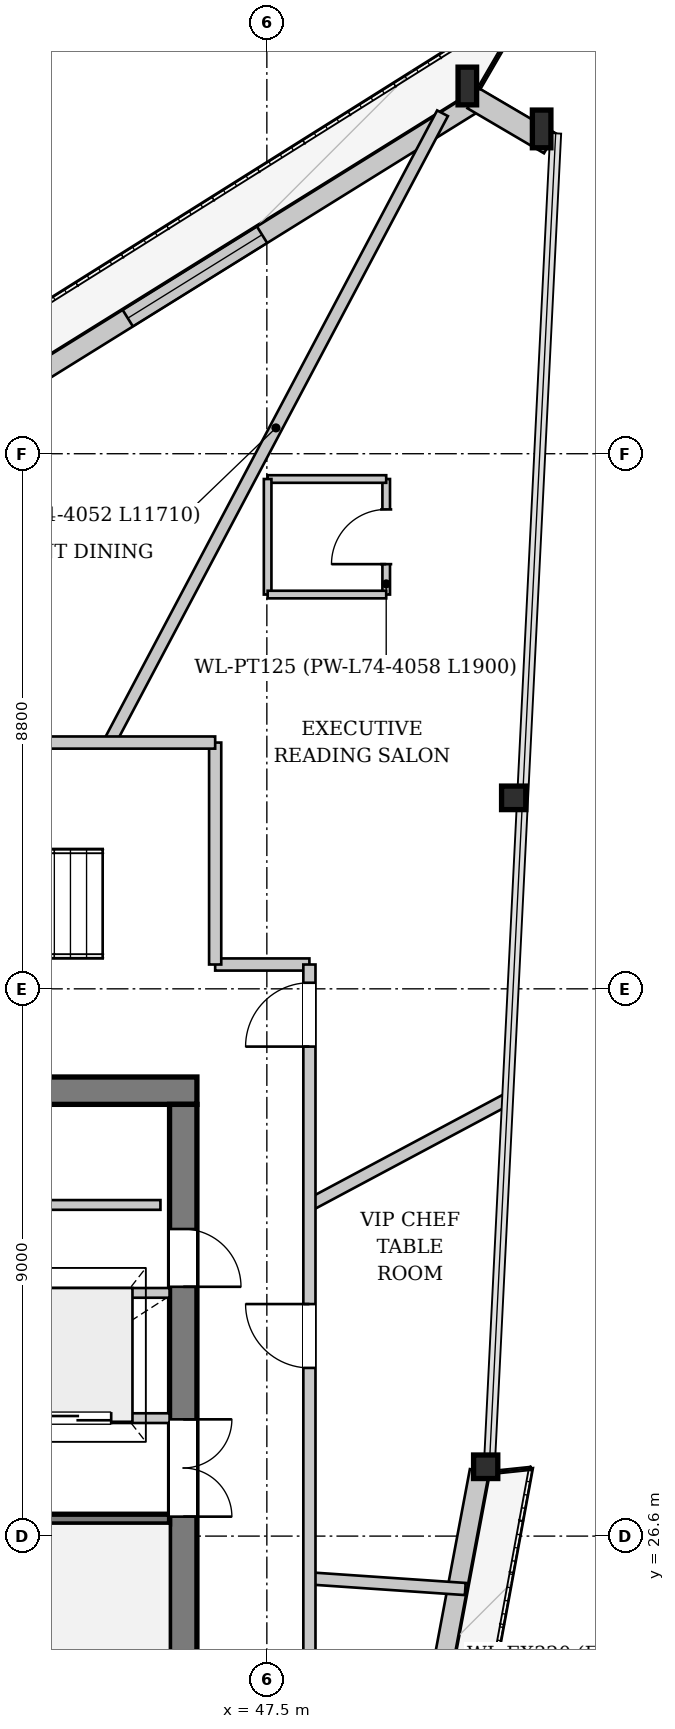
"""IFC4 building model, lengths in metres.
Left out: names, types, materials, properties, quantities, classifications, styles, units other than length and angle.
Written with IfcOpenShell. Run it as: python <this file> out.ifc"""

import sys

from ifc_helpers import new_model, si_unit, direction, frame, frame_2d, origin, origin_2d, place, context, subcontext, project, spatial, rectangle, i_section, extrude, source, transform, mapped, element, fill, save


model = new_model("IFC4")
c1 = context("Model", 3, precision=1e-05, world=origin(), true_north=direction((0.0, 1.0)))
c2 = subcontext(c1, "Body", "Model", "MODEL_VIEW")
j1 = project(units=[si_unit("LENGTHUNIT", "METRE"), si_unit("PLANEANGLEUNIT", "RADIAN")], contexts=[c1])
p1 = place(None, origin())
s1 = spatial("IfcSite", under=j1, at=p1, CompositionType="ELEMENT")
p2 = place(p1, origin())
s2 = spatial("IfcBuilding", under=s1, at=p2, CompositionType="ELEMENT")
p3 = place(p2, frame((0.0, 0.0, 277.7)))
s3 = spatial("IfcBuildingStorey", under=s2, at=p3, CompositionType="ELEMENT", Elevation=277.7)
m1 = source(origin(), c2, "Body", "SweptSolid", [
    extrude(i_section(OverallWidth=0.305, OverallDepth=0.62, WebThickness=0.021, FlangeThickness=0.04, at=origin_2d()), origin(), (0.0, 0.0, 1.0), 3.965),
])
p4 = place(p3, frame((52.25, 49.668, 0.0), z_axis=(-0.116565767107, 0.036761628612, 0.992502395262), x_axis=(-0.30076967496, -0.953696808543, 0.0)))
e1 = element("IfcColumn", 1, at=p4, inside=s3, PredefinedType="COLUMN", context=c2, shape_type="MappedRepresentation", body=[
    mapped(m1, transform((0.0, 0.0, 0.0), x_axis=(1.0, 0.0, 0.0), y_axis=(0.0, 1.0, 0.0), z_axis=(0.0, 0.0, 1.0), scale=1.0)),
])
m2 = source(origin(), c2, "Body", "SweptSolid", [
    extrude(i_section(OverallWidth=0.305, OverallDepth=0.62, WebThickness=0.021, FlangeThickness=0.04, at=origin_2d()), origin(), (0.0, 0.0, 1.0), 3.955),
])
p5 = place(p3, frame((50.991, 50.409, 0.0), z_axis=(-0.098091029512, 0.019568820865, 0.994985030631), x_axis=(-0.195641369689, -0.980675509262, 0.0)))
e2 = element("IfcColumn", 2, at=p5, inside=s3, PredefinedType="COLUMN", context=c2, shape_type="MappedRepresentation", body=[
    mapped(m2, transform((0.0, 0.0, 0.0), x_axis=(1.0, 0.0, 0.0), y_axis=(0.0, 1.0, 0.0), z_axis=(0.0, 0.0, 1.0), scale=1.0)),
])
m3 = source(origin(), c2, "Body", "SweptSolid", [
    extrude(i_section(OverallWidth=0.398, OverallDepth=0.387, WebThickness=0.019, FlangeThickness=0.029, at=origin_2d()), origin(), (0.0, 0.0, 1.0), 3.941),
])
p6 = place(p3, frame((51.154, 27.642, 0.0), z_axis=(-0.027750061815, 0.049615623914, 0.998382804305), x_axis=(-0.872766014986, -0.488138794899, 0.0)))
e3 = element("IfcColumn", 3, at=p6, inside=s3, PredefinedType="COLUMN", context=c2, shape_type="MappedRepresentation", body=[
    mapped(m3, transform((0.0, 0.0, 0.0), x_axis=(1.0, 0.0, 0.0), y_axis=(0.0, 1.0, 0.0), z_axis=(0.0, 0.0, 1.0), scale=1.0)),
])
m4 = source(origin(), c2, "Body", "SweptSolid", [
    extrude(i_section(OverallWidth=0.398, OverallDepth=0.387, WebThickness=0.019, FlangeThickness=0.029, at=origin_2d()), origin(), (0.0, 0.0, 1.0), 3.949),
])
p7 = place(p3, frame((51.702, 38.656, 0.0), z_axis=(-0.072270027482, 0.043213643464, 0.996448505517), x_axis=(-0.513199536889, -0.858269325641, 0.0)))
e4 = element("IfcColumn", 4, at=p7, inside=s3, PredefinedType="COLUMN", context=c2, shape_type="MappedRepresentation", body=[
    mapped(m4, transform((0.0, 0.0, 0.0), x_axis=(1.0, 0.0, 0.0), y_axis=(0.0, 1.0, 0.0), z_axis=(0.0, 0.0, 1.0), scale=1.0)),
])
p8 = place(p3, frame((50.997, 27.672, 0.0), z_axis=(0.0, 0.0, 1.0), x_axis=(-0.184819886047, -0.982772409931, 0.0)))
e5 = element("IfcWall", 5, at=p8, inside=s3, PredefinedType="SOLIDWALL", context=c2, shape_type="SweptSolid", body=[
    extrude(rectangle(XDim=22.053, YDim=0.32, at=frame_2d((11.027, 0.0))), origin(), (0.0, 0.0, 1.0), 3.462),
])
p9 = place(p8, frame((6.307, 0.0, 0.0)))
e6 = element("IfcOpeningElement", 6, at=p9, cuts=e5, PredefinedType="OPENING", context=c2, shape_type="SweptSolid", body=[
    extrude(rectangle(XDim=1.5, YDim=2.3, at=frame_2d((0.75, 1.15))), frame((0.0, 0.17, 0.0), z_axis=(0.0, -1.0, 0.0), x_axis=(1.0, 0.0, 0.0)), (0.0, 0.0, 1.0), 0.34),
])
p10 = place(p8, frame((13.919, 0.0, 0.65)))
e7 = element("IfcOpeningElement", 7, at=p10, cuts=e5, PredefinedType="OPENING", context=c2, shape_type="SweptSolid", body=[
    extrude(rectangle(XDim=2.6, YDim=2.35, at=frame_2d((1.3, 1.175))), frame((0.0, 0.17, 0.0), z_axis=(0.0, -1.0, 0.0), x_axis=(1.0, 0.0, 0.0)), (0.0, 0.0, 1.0), 0.34),
])
p11 = place(p3, frame((32.774, 38.898, 0.0), z_axis=(0.0, 0.0, 1.0), x_axis=(0.849325275004, 0.527869848769, 0.0)))
e8 = element("IfcWall", 8, at=p11, inside=s3, PredefinedType="SOLIDWALL", context=c2, shape_type="SweptSolid", body=[
    extrude(rectangle(XDim=21.549, YDim=0.32, at=frame_2d((10.774, 0.0))), origin(), (0.0, 0.0, 1.0), 3.462),
])
p12 = place(p11, frame((6.146, 0.0, 0.0)))
e9 = element("IfcOpeningElement", 9, at=p12, cuts=e8, PredefinedType="OPENING", context=c2, shape_type="SweptSolid", body=[
    extrude(rectangle(XDim=1.5, YDim=2.3, at=frame_2d((0.75, 1.15))), frame((0.0, 0.17, 0.0), z_axis=(0.0, -1.0, 0.0), x_axis=(1.0, 0.0, 0.0)), (0.0, 0.0, 1.0), 0.34),
])
p13 = place(p11, frame((14.646, 0.0, 0.65)))
e10 = element("IfcOpeningElement", 10, at=p13, cuts=e8, PredefinedType="OPENING", context=c2, shape_type="SweptSolid", body=[
    extrude(rectangle(XDim=2.6, YDim=2.35, at=frame_2d((1.3, 1.175))), frame((0.0, 0.17, 0.0), z_axis=(0.0, -1.0, 0.0), x_axis=(1.0, 0.0, 0.0)), (0.0, 0.0, 1.0), 0.34),
])
p14 = place(p3, frame((50.895, 50.245, 0.0), z_axis=(0.0, 0.0, 1.0), x_axis=(0.862045920942, -0.506830178844, 0.0)))
e11 = element("IfcWall", 11, at=p14, inside=s3, PredefinedType="SOLIDWALL", context=c2, shape_type="SweptSolid", body=[
    extrude(rectangle(XDim=1.46, YDim=0.38, at=frame_2d((0.73, 0.0))), origin(), (0.0, 0.0, 1.0), 3.462),
])
p15 = place(p3, frame((29.65, 33.925, 0.0), z_axis=(0.0, 0.0, 1.0), x_axis=(1.0, 0.0, 0.0)))
e12 = element("IfcWall", 12, at=p15, inside=s3, PredefinedType="SHEAR", context=c2, shape_type="SweptSolid", body=[
    extrude(rectangle(XDim=16.7, YDim=0.45, at=frame_2d((8.35, 0.0))), origin(), (0.0, 0.0, 1.0), 3.92),
])
p16 = place(p15, frame((1.45, 0.0, 0.0)))
e13 = element("IfcOpeningElement", 13, at=p16, cuts=e12, PredefinedType="OPENING", context=c2, shape_type="SweptSolid", body=[
    extrude(rectangle(XDim=0.95, YDim=2.1, at=frame_2d((0.475, 1.05))), frame((0.0, 0.235, 0.0), z_axis=(0.0, -1.0, 0.0), x_axis=(1.0, 0.0, 0.0)), (0.0, 0.0, 1.0), 0.47),
])
p17 = place(p15, frame((3.83, 0.0, 0.0)))
e14 = element("IfcOpeningElement", 14, at=p17, cuts=e12, PredefinedType="OPENING", context=c2, shape_type="SweptSolid", body=[
    extrude(rectangle(XDim=1.32, YDim=2.2, at=frame_2d((0.66, 1.1))), frame((0.0, 0.235, 0.0), z_axis=(0.0, -1.0, 0.0), x_axis=(1.0, 0.0, 0.0)), (0.0, 0.0, 1.0), 0.47),
])
p18 = place(p3, frame((46.125, 33.7, 0.0), z_axis=(0.0, 0.0, 1.0), x_axis=(0.0, -1.0, 0.0)))
e15 = element("IfcWall", 15, at=p18, inside=s3, PredefinedType="SHEAR", context=c2, shape_type="SweptSolid", body=[
    extrude(rectangle(XDim=14.2, YDim=0.45, at=frame_2d((7.1, 0.0))), origin(), (0.0, 0.0, 1.0), 3.92),
])
p19 = place(p18, frame((5.18, 0.0, 0.0)))
e16 = element("IfcOpeningElement", 16, at=p19, cuts=e15, PredefinedType="OPENING", context=c2, shape_type="SweptSolid", body=[
    extrude(rectangle(XDim=1.6, YDim=2.2, at=frame_2d((0.8, 1.1))), frame((0.0, 0.235, 0.0), z_axis=(0.0, -1.0, 0.0), x_axis=(1.0, 0.0, 0.0)), (0.0, 0.0, 1.0), 0.47),
])
p20 = place(p18, frame((2.05, 0.0, 0.0)))
e17 = element("IfcOpeningElement", 17, at=p20, cuts=e15, PredefinedType="OPENING", context=c2, shape_type="SweptSolid", body=[
    extrude(rectangle(XDim=0.95, YDim=2.1, at=frame_2d((0.475, 1.05))), frame((0.0, 0.235, 0.0), z_axis=(0.0, -1.0, 0.0), x_axis=(1.0, 0.0, 0.0)), (0.0, 0.0, 1.0), 0.47),
])
p21 = place(p3, frame((42.88, 26.88, 0.0), z_axis=(0.0, 0.0, 1.0), x_axis=(1.0, 0.0, 0.0)))
e18 = element("IfcWall", 18, at=p21, inside=s3, PredefinedType="PARTITIONING", context=c2, shape_type="SweptSolid", body=[
    extrude(rectangle(XDim=3.02, YDim=0.16, at=frame_2d((1.51, 0.0))), origin(), (0.0, 0.0, 1.0), 3.92),
])
p22 = place(p3, frame((33.28, 28.54, 0.0), z_axis=(0.0, 0.0, 1.0), x_axis=(1.0, 0.0, 0.0)))
e19 = element("IfcWall", 19, at=p22, inside=s3, PredefinedType="PARTITIONING", context=c2, shape_type="SweptSolid", body=[
    extrude(rectangle(XDim=12.62, YDim=0.16, at=frame_2d((6.31, 0.0))), origin(), (0.0, 0.0, 1.0), 3.92),
])
p23 = place(p22, frame((5.63, 0.0, 0.0)))
e20 = element("IfcOpeningElement", 20, at=p23, cuts=e19, PredefinedType="OPENING", context=c2, shape_type="SweptSolid", body=[
    extrude(rectangle(XDim=1.1, YDim=2.2, at=frame_2d((0.55, 1.1))), frame((0.0, 0.09, 0.0), z_axis=(0.0, -1.0, 0.0), x_axis=(1.0, 0.0, 0.0)), (0.0, 0.0, 1.0), 0.18),
])
p24 = place(p22, frame((7.76, 0.0, 0.0)))
e21 = element("IfcOpeningElement", 21, at=p24, cuts=e19, PredefinedType="OPENING", context=c2, shape_type="SweptSolid", body=[
    extrude(rectangle(XDim=1.1, YDim=2.2, at=frame_2d((0.55, 1.1))), frame((0.0, 0.09, 0.0), z_axis=(0.0, -1.0, 0.0), x_axis=(1.0, 0.0, 0.0)), (0.0, 0.0, 1.0), 0.18),
])
p25 = place(p22, frame((10.56, 0.0, 0.0)))
e22 = element("IfcOpeningElement", 22, at=p25, cuts=e19, PredefinedType="OPENING", context=c2, shape_type="SweptSolid", body=[
    extrude(rectangle(XDim=1.1, YDim=2.2, at=frame_2d((0.55, 1.1))), frame((0.0, 0.09, 0.0), z_axis=(0.0, -1.0, 0.0), x_axis=(1.0, 0.0, 0.0)), (0.0, 0.0, 1.0), 0.18),
])
p26 = place(p3, frame((40.72, 30.6, 0.0), z_axis=(0.0, 0.0, 1.0), x_axis=(1.0, 0.0, 0.0)))
e23 = element("IfcWall", 23, at=p26, inside=s3, PredefinedType="PARTITIONING", context=c2, shape_type="SweptSolid", body=[
    extrude(rectangle(XDim=5.18, YDim=0.16, at=frame_2d((2.59, 0.0))), origin(), (0.0, 0.0, 1.0), 3.92),
])
p27 = place(p3, frame((40.72, 32.046, 0.0), z_axis=(0.0, 0.0, 1.0), x_axis=(1.0, 0.0, 0.0)))
e24 = element("IfcWall", 24, at=p27, inside=s3, PredefinedType="PARTITIONING", context=c2, shape_type="SweptSolid", body=[
    extrude(rectangle(XDim=5.03, YDim=0.16, at=frame_2d((2.515, 0.0))), origin(), (0.0, 0.0, 1.0), 3.92),
])
p28 = place(p27, frame((2.1, 0.0, 0.0)))
e25 = element("IfcOpeningElement", 25, at=p28, cuts=e24, PredefinedType="OPENING", context=c2, shape_type="SweptSolid", body=[
    extrude(rectangle(XDim=0.95, YDim=2.1, at=frame_2d((0.475, 1.05))), frame((0.0, 0.09, 0.0), z_axis=(0.0, -1.0, 0.0), x_axis=(1.0, 0.0, 0.0)), (0.0, 0.0, 1.0), 0.18),
])
p29 = place(p3, frame((44.91, 39.65, 0.0), z_axis=(0.0, 0.0, 1.0), x_axis=(0.467924120406, 0.883768644806, 0.0)))
e26 = element("IfcWall", 26, at=p29, inside=s3, PredefinedType="PARTITIONING", context=c2, shape_type="SweptSolid", body=[
    extrude(rectangle(XDim=11.71, YDim=0.2, at=frame_2d((5.855, 0.0))), origin(), (0.0, 0.0, 1.0), 3.515),
])
p30 = place(p3, frame((48.2, 25.905, 0.0), z_axis=(0.0, 0.0, 1.0), x_axis=(0.997689551273, -0.067937907539, 0.0)))
e27 = element("IfcWall", 27, at=p30, inside=s3, PredefinedType="PARTITIONING", context=c2, shape_type="SweptSolid", body=[
    extrude(rectangle(XDim=2.569, YDim=0.2, at=frame_2d((1.285, 0.0))), origin(), (0.0, 0.0, 1.0), 3.92),
])
p31 = place(p3, frame((48.2, 32.046, 0.0), z_axis=(0.0, 0.0, 1.0), x_axis=(0.882140511226, 0.470986325124, 0.0)))
e28 = element("IfcWall", 28, at=p31, inside=s3, PredefinedType="PARTITIONING", context=c2, shape_type="SweptSolid", body=[
    extrude(rectangle(XDim=3.66, YDim=0.2, at=frame_2d((1.83, 0.0))), origin(), (0.0, 0.0, 1.0), 3.92),
])
p32 = place(p3, frame((49.463, 42.084, 0.0), z_axis=(0.0, 0.0, 1.0), x_axis=(0.0, 1.0, 0.0)))
e29 = element("IfcWall", 29, at=p32, inside=s3, PredefinedType="PARTITIONING", context=c2, shape_type="SweptSolid", body=[
    extrude(rectangle(XDim=1.9, YDim=0.125, at=frame_2d((0.95, 0.0))), origin(), (0.0, 0.0, 1.0), 3.92),
])
p33 = place(p32, frame((0.5, 0.0, 0.0)))
e30 = element("IfcOpeningElement", 30, at=p33, cuts=e29, PredefinedType="OPENING", context=c2, shape_type="SweptSolid", body=[
    extrude(rectangle(XDim=0.9, YDim=2.1, at=frame_2d((0.45, 1.05))), frame((0.0, 0.073, 0.0), z_axis=(0.0, -1.0, 0.0), x_axis=(1.0, 0.0, 0.0)), (0.0, 0.0, 1.0), 0.145),
])
p34 = place(p3, frame((49.463, 43.984, 0.0), z_axis=(0.0, 0.0, 1.0), x_axis=(-1.0, 0.0, 0.0)))
e31 = element("IfcWall", 31, at=p34, inside=s3, PredefinedType="PARTITIONING", context=c2, shape_type="SweptSolid", body=[
    extrude(rectangle(XDim=1.95, YDim=0.125, at=frame_2d((0.975, 0.0))), origin(), (0.0, 0.0, 1.0), 3.92),
])
p35 = place(p3, frame((47.513, 43.984, 0.0), z_axis=(0.0, 0.0, 1.0), x_axis=(0.0, -1.0, 0.0)))
e32 = element("IfcWall", 32, at=p35, inside=s3, PredefinedType="PARTITIONING", context=c2, shape_type="SweptSolid", body=[
    extrude(rectangle(XDim=1.9, YDim=0.125, at=frame_2d((0.95, 0.0))), origin(), (0.0, 0.0, 1.0), 3.92),
])
p36 = place(p3, frame((47.513, 42.084, 0.0), z_axis=(0.0, 0.0, 1.0), x_axis=(1.0, 0.0, 0.0)))
e33 = element("IfcWall", 33, at=p36, inside=s3, PredefinedType="PARTITIONING", context=c2, shape_type="SweptSolid", body=[
    extrude(rectangle(XDim=1.95, YDim=0.125, at=frame_2d((0.975, 0.0))), origin(), (0.0, 0.0, 1.0), 3.92),
])
p37 = place(p3, frame((46.65, 36.0, 0.0), z_axis=(0.0, 0.0, 1.0), x_axis=(1.0, 0.0, 0.0)))
e34 = element("IfcWall", 34, at=p37, inside=s3, PredefinedType="PARTITIONING", context=c2, shape_type="SweptSolid", body=[
    extrude(rectangle(XDim=1.55, YDim=0.2, at=frame_2d((0.775, 0.0))), origin(), (0.0, 0.0, 1.0), 3.92),
])
p38 = place(p3, frame((48.2, 23.0, 0.0), z_axis=(0.0, 0.0, 1.0), x_axis=(0.0, 1.0, 0.0)))
e35 = element("IfcWall", 35, at=p38, inside=s3, PredefinedType="PARTITIONING", context=c2, shape_type="SweptSolid", body=[
    extrude(rectangle(XDim=13.0, YDim=0.2, at=frame_2d((6.5, 0.0))), origin(), (0.0, 0.0, 1.0), 3.605),
])
p39 = place(p38, frame((6.366, 0.0, 0.0)))
e36 = element("IfcOpeningElement", 36, at=p39, cuts=e35, PredefinedType="OPENING", context=c2, shape_type="SweptSolid", body=[
    extrude(rectangle(XDim=1.05, YDim=2.2, at=frame_2d((0.525, 1.1))), frame((0.0, 0.11, 0.0), z_axis=(0.0, -1.0, 0.0), x_axis=(1.0, 0.0, 0.0)), (0.0, 0.0, 1.0), 0.22),
])
p40 = place(p38, frame((11.65, 0.0, 0.0)))
e37 = element("IfcOpeningElement", 37, at=p40, cuts=e35, PredefinedType="OPENING", context=c2, shape_type="SweptSolid", body=[
    extrude(rectangle(XDim=1.05, YDim=2.2, at=frame_2d((0.525, 1.1))), frame((0.0, 0.11, 0.0), z_axis=(0.0, -1.0, 0.0), x_axis=(1.0, 0.0, 0.0)), (0.0, 0.0, 1.0), 0.22),
])
p41 = place(p3, frame((46.65, 36.0, 0.0), z_axis=(0.0, 0.0, 1.0), x_axis=(0.0, 1.0, 0.0)))
e38 = element("IfcWall", 38, at=p41, inside=s3, PredefinedType="PARTITIONING", context=c2, shape_type="SweptSolid", body=[
    extrude(rectangle(XDim=3.65, YDim=0.2, at=frame_2d((1.825, 0.0))), origin(), (0.0, 0.0, 1.0), 3.92),
])
p42 = place(p3, frame((36.55, 39.65, 0.0), z_axis=(0.0, 0.0, 1.0), x_axis=(1.0, 0.0, 0.0)))
e39 = element("IfcWall", 39, at=p42, inside=s3, PredefinedType="PARTITIONING", context=c2, shape_type="SweptSolid", body=[
    extrude(rectangle(XDim=10.1, YDim=0.2, at=frame_2d((5.05, 0.0))), origin(), (0.0, 0.0, 1.0), 3.92),
])
m5 = source(origin(), c2, "Body", "SweptSolid", [
    extrude(rectangle(XDim=2.6, YDim=2.35, at=frame_2d((1.3, 1.175))), frame((0.0, 0.03, 0.0), z_axis=(0.0, -1.0, 0.0), x_axis=(1.0, 0.0, 0.0)), (0.0, 0.0, 1.0), 0.06),
])
p43 = place(p13, origin())
e40 = element("IfcWindow", 40, at=p43, inside=s3, PartitioningType="SINGLE_PANEL", PredefinedType="WINDOW", context=c2, shape_type="MappedRepresentation", body=[
    mapped(m5, transform((0.0, 0.0, 0.0), x_axis=(1.0, 0.0, 0.0), y_axis=(0.0, 1.0, 0.0), z_axis=(0.0, 0.0, 1.0), scale=1.0)),
])
fill(e10, e40)
m6 = source(origin(), c2, "Body", "SweptSolid", [
    extrude(rectangle(XDim=1.6, YDim=2.2, at=frame_2d((0.8, 1.1))), frame((0.0, 0.025, 0.0), z_axis=(0.0, -1.0, 0.0), x_axis=(1.0, 0.0, 0.0)), (0.0, 0.0, 1.0), 0.05),
])
p44 = place(p19, origin())
e41 = element("IfcDoor", 41, at=p44, inside=s3, OperationType="DOUBLE_DOOR_SINGLE_SWING", PredefinedType="DOOR", context=c2, shape_type="MappedRepresentation", body=[
    mapped(m6, transform((0.0, 0.0, 0.0), x_axis=(1.0, 0.0, 0.0), y_axis=(0.0, 1.0, 0.0), z_axis=(0.0, 0.0, 1.0), scale=1.0)),
])
fill(e16, e41)
m7 = source(origin(), c2, "Body", "SweptSolid", [
    extrude(rectangle(XDim=1.1, YDim=2.2, at=frame_2d((0.55, 1.1))), frame((0.0, 0.025, 0.0), z_axis=(0.0, -1.0, 0.0), x_axis=(1.0, 0.0, 0.0)), (0.0, 0.0, 1.0), 0.05),
])
p45 = place(p25, origin())
e42 = element("IfcDoor", 42, at=p45, inside=s3, OperationType="DOUBLE_DOOR_SLIDING", PredefinedType="DOOR", context=c2, shape_type="MappedRepresentation", body=[
    mapped(m7, transform((0.0, 0.0, 0.0), x_axis=(1.0, 0.0, 0.0), y_axis=(0.0, 1.0, 0.0), z_axis=(0.0, 0.0, 1.0), scale=1.0)),
])
fill(e22, e42)
m8 = source(origin(), c2, "Body", "SweptSolid", [
    extrude(rectangle(XDim=0.95, YDim=2.1, at=frame_2d((0.475, 1.05))), frame((0.0, 0.025, 0.0), z_axis=(0.0, -1.0, 0.0), x_axis=(1.0, 0.0, 0.0)), (0.0, 0.0, 1.0), 0.05),
])
p46 = place(p20, origin())
e43 = element("IfcDoor", 43, at=p46, inside=s3, OperationType="SINGLE_SWING_RIGHT", PredefinedType="DOOR", context=c2, shape_type="MappedRepresentation", body=[
    mapped(m8, transform((0.0, 0.0, 0.0), x_axis=(1.0, 0.0, 0.0), y_axis=(0.0, 1.0, 0.0), z_axis=(0.0, 0.0, 1.0), scale=1.0)),
])
fill(e17, e43)
m9 = source(origin(), c2, "Body", "SweptSolid", [
    extrude(rectangle(XDim=0.9, YDim=2.1, at=frame_2d((0.45, 1.05))), frame((0.0, 0.025, 0.0), z_axis=(0.0, -1.0, 0.0), x_axis=(1.0, 0.0, 0.0)), (0.0, 0.0, 1.0), 0.05),
])
p47 = place(p33, origin())
e44 = element("IfcDoor", 44, at=p47, inside=s3, OperationType="SINGLE_SWING_LEFT", PredefinedType="DOOR", context=c2, shape_type="MappedRepresentation", body=[
    mapped(m9, transform((0.0, 0.0, 0.0), x_axis=(1.0, 0.0, 0.0), y_axis=(0.0, 1.0, 0.0), z_axis=(0.0, 0.0, 1.0), scale=1.0)),
])
fill(e30, e44)
m10 = source(origin(), c2, "Body", "SweptSolid", [
    extrude(rectangle(XDim=1.05, YDim=2.2, at=frame_2d((0.525, 1.1))), frame((0.0, 0.025, 0.0), z_axis=(0.0, -1.0, 0.0), x_axis=(1.0, 0.0, 0.0)), (0.0, 0.0, 1.0), 0.05),
])
p48 = place(p39, origin())
e45 = element("IfcDoor", 45, at=p48, inside=s3, OperationType="SINGLE_SWING_RIGHT", PredefinedType="DOOR", context=c2, shape_type="MappedRepresentation", body=[
    mapped(m10, transform((0.0, 0.0, 0.0), x_axis=(1.0, 0.0, 0.0), y_axis=(0.0, 1.0, 0.0), z_axis=(0.0, 0.0, 1.0), scale=1.0)),
])
fill(e36, e45)
p49 = place(p40, origin())
e46 = element("IfcDoor", 46, at=p49, inside=s3, OperationType="SINGLE_SWING_LEFT", PredefinedType="DOOR", context=c2, shape_type="MappedRepresentation", body=[
    mapped(m10, transform((0.0, 0.0, 0.0), x_axis=(1.0, 0.0, 0.0), y_axis=(0.0, 1.0, 0.0), z_axis=(0.0, 0.0, 1.0), scale=1.0)),
])
fill(e37, e46)
save(model, sys.argv[1])
